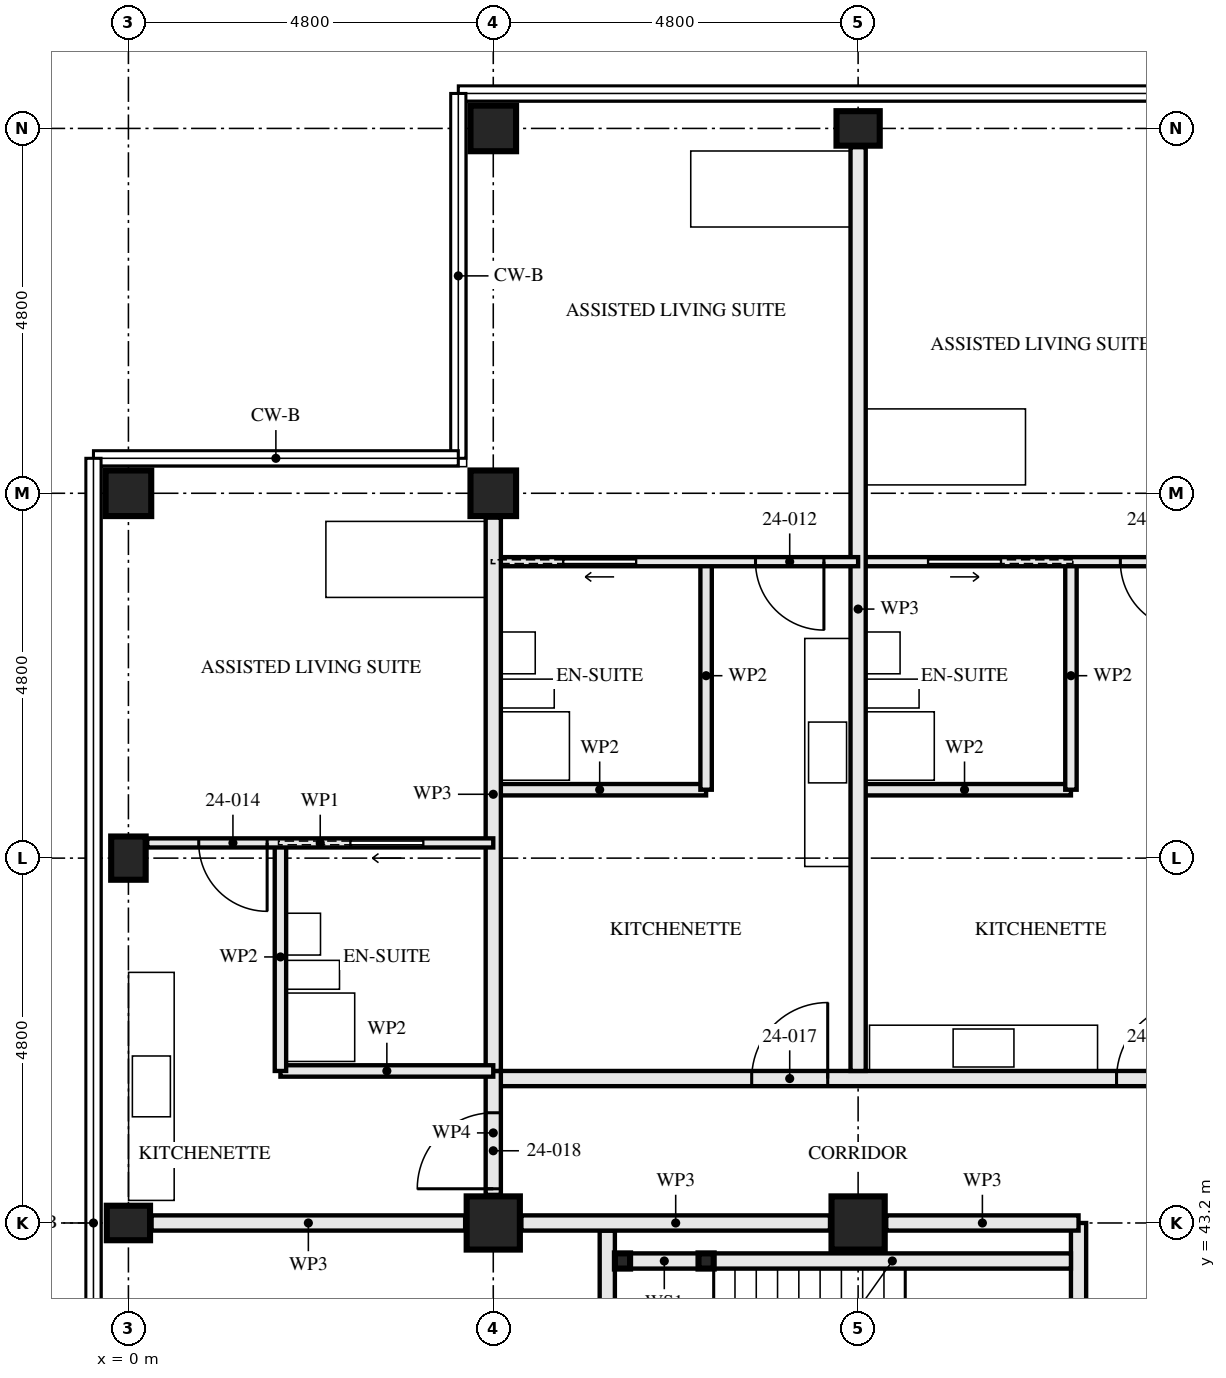
"""IFC4 building model, lengths in metres.
Left out: names, types, materials, properties, quantities, classifications, styles, units other than length and angle.
Written with IfcOpenShell. Run it as: python <this file> out.ifc"""

import sys

from ifc_helpers import new_model, si_unit, direction, frame, frame_2d, origin, origin_2d, place, context, subcontext, project, spatial, rectangle, hollow_rectangle, i_section, extrude, element, fill, save


model = new_model("IFC4")
c1 = context("Model", 3, precision=1e-05, world=origin(), true_north=direction((0.0, 1.0)))
c2 = subcontext(c1, "Body", "Model", "MODEL_VIEW")
j1 = project(units=[si_unit("LENGTHUNIT", "METRE"), si_unit("PLANEANGLEUNIT", "RADIAN")], contexts=[c1])
p1 = place(None, origin())
s1 = spatial("IfcSite", under=j1, at=p1, CompositionType="ELEMENT")
p2 = place(p1, origin())
s2 = spatial("IfcBuilding", under=s1, at=p2, CompositionType="ELEMENT")
p3 = place(p2, frame((0.0, 0.0, 91.0)))
s3 = spatial("IfcBuildingStorey", under=s2, at=p3, CompositionType="ELEMENT", Elevation=91.0)
for number, where, z_axis, x_axis in (
    (1, (0.0, 43.2, 0.0), (0.0, 0.0, 1.0), (0.0, 1.0, 0.0)),
    (2, (0.0, 48.0, 0.0), (0.0, 0.0, 1.0), (1.0, 0.0, 0.0)),
):
    element("IfcColumn", number, at=place(p3, frame(where, z_axis=z_axis, x_axis=x_axis)), inside=s3, PredefinedType="COLUMN", context=c2, shape_type="SweptSolid", body=[
        extrude(i_section(OverallWidth=0.454, OverallDepth=0.569, WebThickness=0.078, FlangeThickness=0.125, FilletRadius=0.015, at=origin_2d()), origin(), (0.0, 0.0, 1.0), 3.5),
    ])
p4 = place(p3, frame((0.0, 52.8, 0.0), z_axis=(0.0, 0.0, 1.0), x_axis=(0.0, 1.0, 0.0)))
e3 = element("IfcColumn", 3, at=p4, inside=s3, PredefinedType="COLUMN", context=c2, shape_type="SweptSolid", body=[
    extrude(hollow_rectangle(XDim=0.6, YDim=0.6, WallThickness=0.05, at=origin_2d()), origin(), (0.0, 0.0, 1.0), 3.5),
])
p5 = place(p3, frame((4.8, 43.2, 0.0), z_axis=(0.0, 0.0, 1.0), x_axis=(0.0, 1.0, 0.0)))
e4 = element("IfcColumn", 4, at=p5, inside=s3, PredefinedType="COLUMN", context=c2, shape_type="SweptSolid", body=[
    extrude(hollow_rectangle(XDim=0.7, YDim=0.7, WallThickness=0.06, at=origin_2d()), origin(), (0.0, 0.0, 1.0), 3.5),
])
for number, where, z_axis, x_axis in (
    (5, (4.8, 52.8, 0.0), (0.0, 0.0, 1.0), (0.0, 1.0, 0.0)),
    (6, (4.8, 57.6, 0.0), (0.0, 0.0, 1.0), (0.0, 1.0, 0.0)),
):
    element("IfcColumn", number, at=place(p3, frame(where, z_axis=z_axis, x_axis=x_axis)), inside=s3, PredefinedType="COLUMN", context=c2, shape_type="SweptSolid", body=[
        extrude(hollow_rectangle(XDim=0.6, YDim=0.6, WallThickness=0.05, at=origin_2d()), origin(), (0.0, 0.0, 1.0), 3.5),
    ])
p6 = place(p3, frame((9.6, 43.2, 0.0), z_axis=(0.0, 0.0, 1.0), x_axis=(0.0, 1.0, 0.0)))
e7 = element("IfcColumn", 7, at=p6, inside=s3, PredefinedType="COLUMN", context=c2, shape_type="SweptSolid", body=[
    extrude(hollow_rectangle(XDim=0.7, YDim=0.7, WallThickness=0.06, at=origin_2d()), origin(), (0.0, 0.0, 1.0), 3.5),
])
p7 = place(p3, frame((9.6, 57.6, 0.0), z_axis=(0.0, 0.0, 1.0), x_axis=(0.0, 1.0, 0.0)))
e8 = element("IfcColumn", 8, at=p7, inside=s3, PredefinedType="COLUMN", context=c2, shape_type="SweptSolid", body=[
    extrude(i_section(OverallWidth=0.454, OverallDepth=0.569, WebThickness=0.078, FlangeThickness=0.125, FilletRadius=0.015, at=origin_2d()), origin(), (0.0, 0.0, 1.0), 3.5),
])
for number, where, z_axis, x_axis in (
    (9, (6.5, 42.7, 0.0), (0.0, 0.0, 1.0), (1.0, 0.0, 0.0)),
    (10, (7.6, 42.7, 0.0), (0.0, 0.0, 1.0), (1.0, 0.0, 0.0)),
):
    element("IfcColumn", number, at=place(p3, frame(where, z_axis=z_axis, x_axis=x_axis)), inside=s3, PredefinedType="COLUMN", context=c2, shape_type="SweptSolid", body=[
        extrude(hollow_rectangle(XDim=0.2, YDim=0.2, WallThickness=0.008, at=origin_2d()), origin(), (0.0, 0.0, 1.0), 3.33),
    ])
p8 = place(p3, frame((6.6, 42.7, 0.0), z_axis=(0.0, 0.0, 1.0), x_axis=(1.0, 0.0, 0.0)))
e11 = element("IfcWall", 11, at=p8, inside=s3, PredefinedType="SOLIDWALL", context=c2, shape_type="SweptSolid", body=[
    extrude(rectangle(XDim=0.9, YDim=0.2, at=frame_2d((0.45, 0.0))), origin(), (0.0, 0.0, 1.0), 2.99),
])
p9 = place(p3, frame((7.7, 42.7, 0.0), z_axis=(0.0, 0.0, 1.0), x_axis=(1.0, 0.0, 0.0)))
e12 = element("IfcWall", 12, at=p9, inside=s3, PredefinedType="SOLIDWALL", context=c2, shape_type="SweptSolid", body=[
    extrude(rectangle(XDim=4.7, YDim=0.2, at=frame_2d((2.35, 0.0))), origin(), (0.0, 0.0, 1.0), 2.99),
])
p10 = place(p3, frame((6.3, 43.1, 0.0), z_axis=(0.0, 0.0, 1.0), x_axis=(0.0, -1.0, 0.0)))
e13 = element("IfcWall", 13, at=p10, inside=s3, PredefinedType="SOLIDWALL", context=c2, shape_type="SweptSolid", body=[
    extrude(rectangle(XDim=3.3, YDim=0.2, at=frame_2d((1.65, 0.0))), origin(), (0.0, 0.0, 1.0), 3.33),
])
p11 = place(p3, frame((12.5, 43.2, 0.0), z_axis=(0.0, 0.0, 1.0), x_axis=(0.0, -1.0, 0.0)))
e14 = element("IfcWall", 14, at=p11, inside=s3, PredefinedType="PARTITIONING", context=c2, shape_type="SweptSolid", body=[
    extrude(rectangle(XDim=14.84, YDim=0.2, at=frame_2d((7.42, 0.0))), origin(), (0.0, 0.0, 1.0), 2.32),
])
p12 = place(p11, frame((1.4, 0.0, 0.0)))
e15 = element("IfcOpeningElement", 15, at=p12, cuts=e14, PredefinedType="OPENING", context=c2, shape_type="SweptSolid", body=[
    extrude(rectangle(XDim=1.0, YDim=2.1, at=frame_2d((0.5, 1.05))), frame((0.0, 0.111, 0.0), z_axis=(0.0, -1.0, 0.0), x_axis=(1.0, 0.0, 0.0)), (0.0, 0.0, 1.0), 0.221),
])
p13 = place(p11, frame((5.2, 0.0, 0.0)))
e16 = element("IfcOpeningElement", 16, at=p13, cuts=e14, PredefinedType="OPENING", context=c2, shape_type="SweptSolid", body=[
    extrude(rectangle(XDim=1.0, YDim=2.1, at=frame_2d((0.5, 1.05))), frame((0.0, 0.111, 0.0), z_axis=(0.0, -1.0, 0.0), x_axis=(1.0, 0.0, 0.0)), (0.0, 0.0, 1.0), 0.221),
])
p14 = place(p11, frame((13.0, 0.0, 0.0)))
e17 = element("IfcOpeningElement", 17, at=p14, cuts=e14, PredefinedType="OPENING", context=c2, shape_type="SweptSolid", body=[
    extrude(rectangle(XDim=1.0, YDim=2.1, at=frame_2d((0.5, 1.05))), frame((0.0, 0.111, 0.0), z_axis=(0.0, -1.0, 0.0), x_axis=(1.0, 0.0, 0.0)), (0.0, 0.0, 1.0), 0.221),
])
p15 = place(p3, frame((12.4, 51.9, 0.0), z_axis=(0.0, 0.0, 1.0), x_axis=(0.0, -1.0, 0.0)))
e18 = element("IfcWall", 18, at=p15, inside=s3, PredefinedType="PARTITIONING", context=c2, shape_type="SweptSolid", body=[
    extrude(rectangle(XDim=3.0, YDim=0.15, at=frame_2d((1.5, 0.0))), origin(), (0.0, 0.0, 1.0), 3.33),
])
p16 = place(p3, frame((12.4, 48.9, 0.0), z_axis=(0.0, 0.0, 1.0), x_axis=(-1.0, 0.0, 0.0)))
e19 = element("IfcWall", 19, at=p16, inside=s3, PredefinedType="PARTITIONING", context=c2, shape_type="SweptSolid", body=[
    extrude(rectangle(XDim=2.8, YDim=0.15, at=frame_2d((1.4, 0.0))), origin(), (0.0, 0.0, 1.0), 3.33),
])
p17 = place(p3, frame((14.4, 51.9, 0.0), z_axis=(0.0, 0.0, 1.0), x_axis=(-1.0, 0.0, 0.0)))
e20 = element("IfcWall", 20, at=p17, inside=s3, PredefinedType="PARTITIONING", context=c2, shape_type="SweptSolid", body=[
    extrude(rectangle(XDim=4.8, YDim=0.12, at=frame_2d((2.4, 0.0))), origin(), (0.0, 0.0, 1.0), 3.33),
])
p18 = place(p17, frame((0.45, 0.0, 0.0)))
e21 = element("IfcOpeningElement", 21, at=p18, cuts=e20, PredefinedType="OPENING", context=c2, shape_type="SweptSolid", body=[
    extrude(rectangle(XDim=0.9, YDim=2.1, at=frame_2d((0.45, 1.05))), frame((0.0, 0.071, 0.0), z_axis=(0.0, -1.0, 0.0), x_axis=(1.0, 0.0, 0.0)), (0.0, 0.0, 1.0), 0.141),
])
p19 = place(p17, frame((2.925, 0.0, 0.0)))
e22 = element("IfcOpeningElement", 22, at=p19, cuts=e20, PredefinedType="OPENING", context=c2, shape_type="SweptSolid", body=[
    extrude(rectangle(XDim=0.95, YDim=2.1, at=frame_2d((0.475, 1.05))), frame((0.0, 0.071, 0.0), z_axis=(0.0, -1.0, 0.0), x_axis=(1.0, 0.0, 0.0)), (0.0, 0.0, 1.0), 0.141),
])
p20 = place(p3, frame((9.6, 57.353, 0.0), z_axis=(0.0, 0.0, 1.0), x_axis=(0.0, -1.0, 0.0)))
e23 = element("IfcWall", 23, at=p20, inside=s3, PredefinedType="PARTITIONING", context=c2, shape_type="SweptSolid", body=[
    extrude(rectangle(XDim=12.153, YDim=0.2, at=frame_2d((6.077, 0.0))), origin(), (0.0, 0.0, 1.0), 2.55),
])
p21 = place(p3, frame((7.6, 51.9, 0.0), z_axis=(0.0, 0.0, 1.0), x_axis=(0.0, -1.0, 0.0)))
e24 = element("IfcWall", 24, at=p21, inside=s3, PredefinedType="PARTITIONING", context=c2, shape_type="SweptSolid", body=[
    extrude(rectangle(XDim=3.0, YDim=0.15, at=frame_2d((1.5, 0.0))), origin(), (0.0, 0.0, 1.0), 3.33),
])
p22 = place(p3, frame((7.6, 48.9, 0.0), z_axis=(0.0, 0.0, 1.0), x_axis=(-1.0, 0.0, 0.0)))
e25 = element("IfcWall", 25, at=p22, inside=s3, PredefinedType="PARTITIONING", context=c2, shape_type="SweptSolid", body=[
    extrude(rectangle(XDim=2.8, YDim=0.15, at=frame_2d((1.4, 0.0))), origin(), (0.0, 0.0, 1.0), 3.33),
])
p23 = place(p3, frame((9.6, 51.9, 0.0), z_axis=(0.0, 0.0, 1.0), x_axis=(-1.0, 0.0, 0.0)))
e26 = element("IfcWall", 26, at=p23, inside=s3, PredefinedType="PARTITIONING", context=c2, shape_type="SweptSolid", body=[
    extrude(rectangle(XDim=4.8, YDim=0.12, at=frame_2d((2.4, 0.0))), origin(), (0.0, 0.0, 1.0), 3.33),
])
p24 = place(p23, frame((0.45, 0.0, 0.0)))
e27 = element("IfcOpeningElement", 27, at=p24, cuts=e26, PredefinedType="OPENING", context=c2, shape_type="SweptSolid", body=[
    extrude(rectangle(XDim=0.9, YDim=2.1, at=frame_2d((0.45, 1.05))), frame((0.0, 0.071, 0.0), z_axis=(0.0, -1.0, 0.0), x_axis=(1.0, 0.0, 0.0)), (0.0, 0.0, 1.0), 0.141),
])
p25 = place(p23, frame((2.925, 0.0, 0.0)))
e28 = element("IfcOpeningElement", 28, at=p25, cuts=e26, PredefinedType="OPENING", context=c2, shape_type="SweptSolid", body=[
    extrude(rectangle(XDim=0.95, YDim=2.1, at=frame_2d((0.475, 1.05))), frame((0.0, 0.071, 0.0), z_axis=(0.0, -1.0, 0.0), x_axis=(1.0, 0.0, 0.0)), (0.0, 0.0, 1.0), 0.141),
])
p26 = place(p3, frame((4.8, 52.48, 0.0), z_axis=(0.0, 0.0, 1.0), x_axis=(0.0, -1.0, 0.0)))
e29 = element("IfcWall", 29, at=p26, inside=s3, PredefinedType="PARTITIONING", context=c2, shape_type="SweptSolid", body=[
    extrude(rectangle(XDim=7.28, YDim=0.2, at=frame_2d((3.64, 0.0))), origin(), (0.0, 0.0, 1.0), 2.55),
])
p27 = place(p3, frame((2.0, 48.2, 0.0), z_axis=(0.0, 0.0, 1.0), x_axis=(0.0, -1.0, 0.0)))
e30 = element("IfcWall", 30, at=p27, inside=s3, PredefinedType="PARTITIONING", context=c2, shape_type="SweptSolid", body=[
    extrude(rectangle(XDim=3.0, YDim=0.15, at=frame_2d((1.5, 0.0))), origin(), (0.0, 0.0, 1.0), 2.55),
])
p28 = place(p3, frame((4.8, 45.2, 0.0), z_axis=(0.0, 0.0, 1.0), x_axis=(-1.0, 0.0, 0.0)))
e31 = element("IfcWall", 31, at=p28, inside=s3, PredefinedType="PARTITIONING", context=c2, shape_type="SweptSolid", body=[
    extrude(rectangle(XDim=2.8, YDim=0.15, at=frame_2d((1.4, 0.0))), origin(), (0.0, 0.0, 1.0), 3.33),
])
p29 = place(p3, frame((4.8, 48.2, 0.0), z_axis=(0.0, 0.0, 1.0), x_axis=(-1.0, 0.0, 0.0)))
e32 = element("IfcWall", 32, at=p29, inside=s3, PredefinedType="PARTITIONING", context=c2, shape_type="SweptSolid", body=[
    extrude(rectangle(XDim=4.553, YDim=0.12, at=frame_2d((2.276, 0.0))), origin(), (0.0, 0.0, 1.0), 3.33),
])
p30 = place(p29, frame((2.975, 0.0, 0.0)))
e33 = element("IfcOpeningElement", 33, at=p30, cuts=e32, PredefinedType="OPENING", context=c2, shape_type="SweptSolid", body=[
    extrude(rectangle(XDim=0.9, YDim=2.1, at=frame_2d((0.45, 1.05))), frame((0.0, 0.071, 0.0), z_axis=(0.0, -1.0, 0.0), x_axis=(1.0, 0.0, 0.0)), (0.0, 0.0, 1.0), 0.141),
])
p31 = place(p29, frame((0.925, 0.0, 0.0)))
e34 = element("IfcOpeningElement", 34, at=p31, cuts=e32, PredefinedType="OPENING", context=c2, shape_type="SweptSolid", body=[
    extrude(rectangle(XDim=0.95, YDim=2.1, at=frame_2d((0.475, 1.05))), frame((0.0, 0.071, 0.0), z_axis=(0.0, -1.0, 0.0), x_axis=(1.0, 0.0, 0.0)), (0.0, 0.0, 1.0), 0.141),
])
p32 = place(p3, frame((14.4, 45.1, 0.0), z_axis=(0.0, 0.0, 1.0), x_axis=(-1.0, 0.0, 0.0)))
e35 = element("IfcWall", 35, at=p32, inside=s3, PredefinedType="PARTITIONING", context=c2, shape_type="SweptSolid", body=[
    extrude(rectangle(XDim=9.6, YDim=0.2, at=frame_2d((4.8, 0.0))), origin(), (0.0, 0.0, 1.0), 3.33),
])
p33 = place(p32, frame((0.4, 0.0, 0.0)))
e36 = element("IfcOpeningElement", 36, at=p33, cuts=e35, PredefinedType="OPENING", context=c2, shape_type="SweptSolid", body=[
    extrude(rectangle(XDim=1.0, YDim=2.1, at=frame_2d((0.5, 1.05))), frame((0.0, 0.111, 0.0), z_axis=(0.0, -1.0, 0.0), x_axis=(1.0, 0.0, 0.0)), (0.0, 0.0, 1.0), 0.221),
])
p34 = place(p32, frame((5.2, 0.0, 0.0)))
e37 = element("IfcOpeningElement", 37, at=p34, cuts=e35, PredefinedType="OPENING", context=c2, shape_type="SweptSolid", body=[
    extrude(rectangle(XDim=1.0, YDim=2.1, at=frame_2d((0.5, 1.05))), frame((0.0, 0.111, 0.0), z_axis=(0.0, -1.0, 0.0), x_axis=(1.0, 0.0, 0.0)), (0.0, 0.0, 1.0), 0.221),
])
p35 = place(p3, frame((4.8, 45.2, 0.0), z_axis=(0.0, 0.0, 1.0), x_axis=(0.0, -1.0, 0.0)))
e38 = element("IfcWall", 38, at=p35, inside=s3, PredefinedType="PARTITIONING", context=c2, shape_type="SweptSolid", body=[
    extrude(rectangle(XDim=1.63, YDim=0.2, at=frame_2d((0.815, 0.0))), origin(), (0.0, 0.0, 1.0), 3.33),
])
p36 = place(p35, frame((0.55, 0.0, 0.0)))
e39 = element("IfcOpeningElement", 39, at=p36, cuts=e38, PredefinedType="OPENING", context=c2, shape_type="SweptSolid", body=[
    extrude(rectangle(XDim=1.0, YDim=2.1, at=frame_2d((0.5, 1.05))), frame((0.0, 0.111, 0.0), z_axis=(0.0, -1.0, 0.0), x_axis=(1.0, 0.0, 0.0)), (0.0, 0.0, 1.0), 0.221),
])
p37 = place(p3, frame((12.5, 43.2, 0.0), z_axis=(0.0, 0.0, 1.0), x_axis=(-1.0, 0.0, 0.0)))
e40 = element("IfcWall", 40, at=p37, inside=s3, PredefinedType="PARTITIONING", context=c2, shape_type="SweptSolid", body=[
    extrude(rectangle(XDim=2.53, YDim=0.2, at=frame_2d((1.265, 0.0))), origin(), (0.0, 0.0, 1.0), 2.32),
])
p38 = place(p3, frame((9.23, 43.2, 0.0), z_axis=(0.0, 0.0, 1.0), x_axis=(-1.0, 0.0, 0.0)))
e41 = element("IfcWall", 41, at=p38, inside=s3, PredefinedType="PARTITIONING", context=c2, shape_type="SweptSolid", body=[
    extrude(rectangle(XDim=4.06, YDim=0.2, at=frame_2d((2.03, 0.0))), origin(), (0.0, 0.0, 1.0), 2.32),
])
p39 = place(p3, frame((4.43, 43.2, 0.0), z_axis=(0.0, 0.0, 1.0), x_axis=(-1.0, 0.0, 0.0)))
e42 = element("IfcWall", 42, at=p39, inside=s3, PredefinedType="PARTITIONING", context=c2, shape_type="SweptSolid", body=[
    extrude(rectangle(XDim=4.125, YDim=0.2, at=frame_2d((2.063, 0.0))), origin(), (0.0, 0.0, 1.0), 2.32),
])
p40 = place(p18, origin())
e43 = element("IfcDoor", 43, at=p40, inside=s3, OperationType="SINGLE_SWING_RIGHT", PredefinedType="DOOR", context=c2, shape_type="SweptSolid", body=[
    extrude(rectangle(XDim=0.9, YDim=2.1, at=frame_2d((0.45, 1.05))), frame((0.0, 0.022, 0.0), z_axis=(0.0, -1.0, 0.0), x_axis=(1.0, 0.0, 0.0)), (0.0, 0.0, 1.0), 0.044),
])
fill(e21, e43)
p41 = place(p19, origin())
e44 = element("IfcDoor", 44, at=p41, inside=s3, OperationType="SLIDING_TO_RIGHT", PredefinedType="DOOR", context=c2, shape_type="SweptSolid", body=[
    extrude(rectangle(XDim=0.95, YDim=2.1, at=frame_2d((0.475, 1.05))), frame((0.0, 0.022, 0.0), z_axis=(0.0, -1.0, 0.0), x_axis=(1.0, 0.0, 0.0)), (0.0, 0.0, 1.0), 0.044),
])
fill(e22, e44)
p42 = place(p24, origin())
e45 = element("IfcDoor", 45, at=p42, inside=s3, OperationType="SINGLE_SWING_RIGHT", PredefinedType="DOOR", context=c2, shape_type="SweptSolid", body=[
    extrude(rectangle(XDim=0.9, YDim=2.1, at=frame_2d((0.45, 1.05))), frame((0.0, 0.022, 0.0), z_axis=(0.0, -1.0, 0.0), x_axis=(1.0, 0.0, 0.0)), (0.0, 0.0, 1.0), 0.044),
])
fill(e27, e45)
p43 = place(p25, origin())
e46 = element("IfcDoor", 46, at=p43, inside=s3, OperationType="SLIDING_TO_LEFT", PredefinedType="DOOR", context=c2, shape_type="SweptSolid", body=[
    extrude(rectangle(XDim=0.95, YDim=2.1, at=frame_2d((0.475, 1.05))), frame((0.0, 0.022, 0.0), z_axis=(0.0, -1.0, 0.0), x_axis=(1.0, 0.0, 0.0)), (0.0, 0.0, 1.0), 0.044),
])
fill(e28, e46)
p44 = place(p30, origin())
e47 = element("IfcDoor", 47, at=p44, inside=s3, OperationType="SINGLE_SWING_RIGHT", PredefinedType="DOOR", context=c2, shape_type="SweptSolid", body=[
    extrude(rectangle(XDim=0.9, YDim=2.1, at=frame_2d((0.45, 1.05))), frame((0.0, 0.022, 0.0), z_axis=(0.0, -1.0, 0.0), x_axis=(1.0, 0.0, 0.0)), (0.0, 0.0, 1.0), 0.044),
])
fill(e33, e47)
p45 = place(p31, origin())
e48 = element("IfcDoor", 48, at=p45, inside=s3, OperationType="SLIDING_TO_LEFT", PredefinedType="DOOR", context=c2, shape_type="SweptSolid", body=[
    extrude(rectangle(XDim=0.95, YDim=2.1, at=frame_2d((0.475, 1.05))), frame((0.0, 0.022, 0.0), z_axis=(0.0, -1.0, 0.0), x_axis=(1.0, 0.0, 0.0)), (0.0, 0.0, 1.0), 0.044),
])
fill(e34, e48)
p46 = place(p33, frame((1.0, 0.0, 0.0), z_axis=(0.0, 0.0, 1.0), x_axis=(-1.0, 0.0, 0.0)))
e49 = element("IfcDoor", 49, at=p46, inside=s3, OperationType="SINGLE_SWING_LEFT", PredefinedType="DOOR", context=c2, shape_type="SweptSolid", body=[
    extrude(rectangle(XDim=1.0, YDim=2.1, at=frame_2d((0.5, 1.05))), frame((0.0, 0.027, 0.0), z_axis=(0.0, -1.0, 0.0), x_axis=(1.0, 0.0, 0.0)), (0.0, 0.0, 1.0), 0.054),
])
fill(e36, e49)
p47 = place(p34, frame((1.0, 0.0, 0.0), z_axis=(0.0, 0.0, 1.0), x_axis=(-1.0, 0.0, 0.0)))
e50 = element("IfcDoor", 50, at=p47, inside=s3, OperationType="SINGLE_SWING_LEFT", PredefinedType="DOOR", context=c2, shape_type="SweptSolid", body=[
    extrude(rectangle(XDim=1.0, YDim=2.1, at=frame_2d((0.5, 1.05))), frame((0.0, 0.027, 0.0), z_axis=(0.0, -1.0, 0.0), x_axis=(1.0, 0.0, 0.0)), (0.0, 0.0, 1.0), 0.054),
])
fill(e37, e50)
p48 = place(p36, frame((1.0, 0.0, 0.0), z_axis=(0.0, 0.0, 1.0), x_axis=(-1.0, 0.0, 0.0)))
e51 = element("IfcDoor", 51, at=p48, inside=s3, OperationType="SINGLE_SWING_RIGHT", PredefinedType="DOOR", context=c2, shape_type="SweptSolid", body=[
    extrude(rectangle(XDim=1.0, YDim=2.1, at=frame_2d((0.5, 1.05))), frame((0.0, 0.027, 0.0), z_axis=(0.0, -1.0, 0.0), x_axis=(1.0, 0.0, 0.0)), (0.0, 0.0, 1.0), 0.054),
])
fill(e39, e51)
save(model, sys.argv[1])
